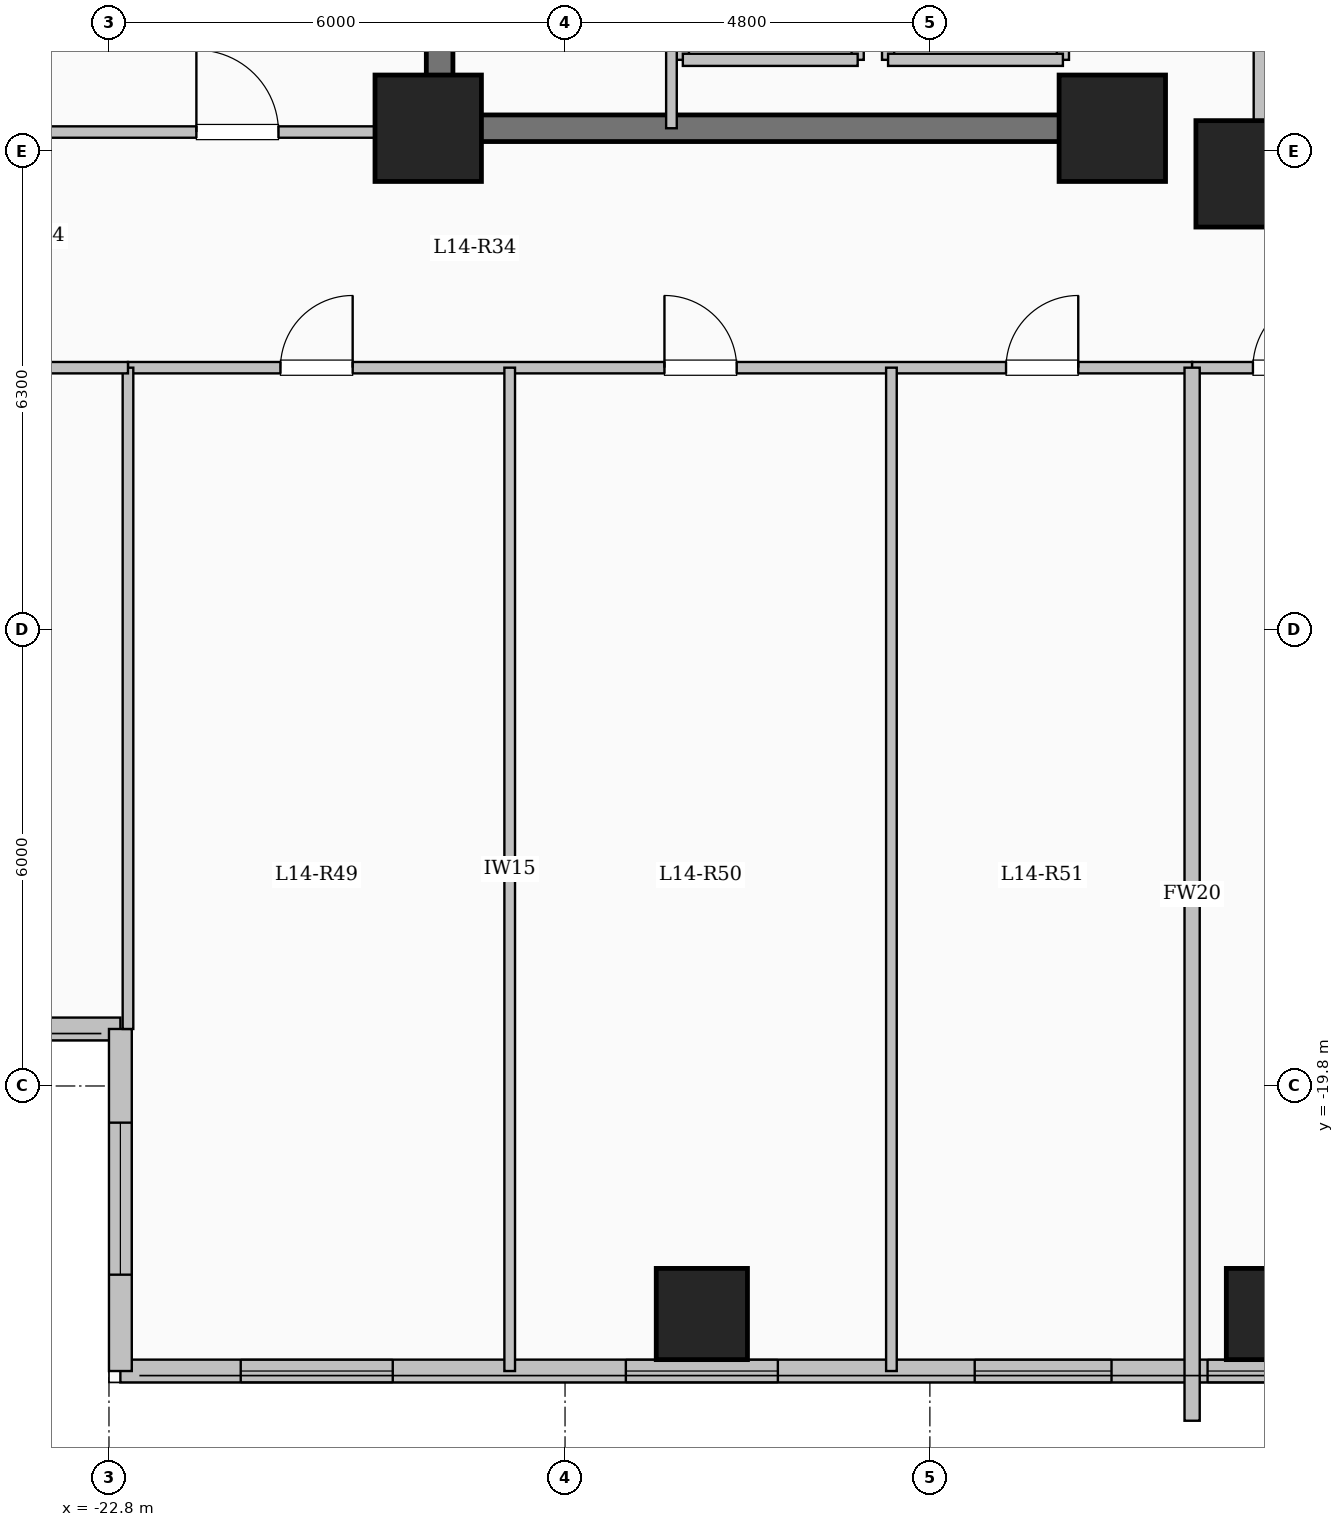
"""IFC4 building model, lengths in metres.
Left out: names, types, materials, properties, quantities, classifications, styles, units other than length and angle.
Written with IfcOpenShell. Run it as: python <this file> out.ifc"""

import sys

from ifc_helpers import new_model, si_unit, direction, frame, frame_2d, origin, origin_2d, place, context, subcontext, project, spatial, rectangle, extrude, element, fill, save


model = new_model("IFC4")
c1 = context("Model", 3, precision=1e-05, world=origin(), true_north=direction((0.0, 1.0)))
c2 = subcontext(c1, "Body", "Model", "MODEL_VIEW")
j1 = project(units=[si_unit("LENGTHUNIT", "METRE"), si_unit("PLANEANGLEUNIT", "RADIAN")], contexts=[c1])
p1 = place(None, origin())
s1 = spatial("IfcSite", under=j1, at=p1, CompositionType="ELEMENT")
p2 = place(p1, origin())
s2 = spatial("IfcBuilding", under=s1, at=p2, CompositionType="ELEMENT")
p3 = place(p2, frame((0.0, 0.0, 54.15)))
s3 = spatial("IfcBuildingStorey", under=s2, at=p3, CompositionType="ELEMENT", Elevation=54.15)
for number, where, z_axis, x_axis in (
    (1, (-7.8, -7.8, 0.0), (0.0, 0.0, 1.0), (1.0, 0.0, 0.0)),
    (2, (-9.6, -7.2, 0.0), (0.0, 0.0, 1.0), (1.0, 0.0, 0.0)),
    (3, (-18.6, -7.2, 0.0), (0.0, 0.0, 1.0), (1.0, 0.0, 0.0)),
):
    element("IfcColumn", number, at=place(p3, frame(where, z_axis=z_axis, x_axis=x_axis)), inside=s3, PredefinedType="COLUMN", context=c2, shape_type="SweptSolid", body=[
        extrude(rectangle(XDim=1.4, YDim=1.4, at=origin_2d()), origin(), (0.0, 0.0, 1.0), 3.35),
    ])
for number, where, z_axis, x_axis in (
    (4, (-15.0, -22.8, 0.0), (0.0, 0.0, 1.0), (1.0, 0.0, 0.0)),
    (5, (-7.5, -22.8, 0.0), (0.0, 0.0, 1.0), (1.0, 0.0, 0.0)),
):
    element("IfcColumn", number, at=place(p3, frame(where, z_axis=z_axis, x_axis=x_axis)), inside=s3, PredefinedType="COLUMN", context=c2, shape_type="SweptSolid", body=[
        extrude(rectangle(XDim=1.2, YDim=1.2, at=origin_2d()), origin(), (0.0, 0.0, 1.0), 3.35),
    ])
p4 = place(p3, frame((-7.62, -7.62, 0.0), z_axis=(0.0, 0.0, 1.0), x_axis=(1.0, 0.0, 0.0)))
e6 = element("IfcWall", 6, at=p4, inside=s3, PredefinedType="SOLIDWALL", context=c2, shape_type="SweptSolid", body=[
    extrude(rectangle(XDim=15.24, YDim=0.24, at=frame_2d((7.62, 0.0))), origin(), (0.0, 0.0, 1.0), 3.1),
])
p5 = place(p4, frame((6.92, 0.0, 0.95)))
e7 = element("IfcOpeningElement", 7, at=p5, cuts=e6, PredefinedType="OPENING", context=c2, shape_type="SweptSolid", body=[
    extrude(rectangle(XDim=1.4, YDim=1.5, at=frame_2d((0.7, 0.75))), frame((0.0, 0.13, 0.0), z_axis=(0.0, -1.0, 0.0), x_axis=(1.0, 0.0, 0.0)), (0.0, 0.0, 1.0), 0.26),
])
p6 = place(p3, frame((-7.62, 7.62, 0.0), z_axis=(0.0, 0.0, 1.0), x_axis=(0.0, -1.0, 0.0)))
e8 = element("IfcWall", 8, at=p6, inside=s3, PredefinedType="SOLIDWALL", context=c2, shape_type="SweptSolid", body=[
    extrude(rectangle(XDim=15.24, YDim=0.24, at=frame_2d((7.62, 0.0))), origin(), (0.0, 0.0, 1.0), 3.1),
])
p7 = place(p6, frame((6.92, 0.0, 0.95)))
e9 = element("IfcOpeningElement", 9, at=p7, cuts=e8, PredefinedType="OPENING", context=c2, shape_type="SweptSolid", body=[
    extrude(rectangle(XDim=1.4, YDim=1.5, at=frame_2d((0.7, 0.75))), frame((0.0, 0.13, 0.0), z_axis=(0.0, -1.0, 0.0), x_axis=(1.0, 0.0, 0.0)), (0.0, 0.0, 1.0), 0.26),
])
p8 = place(p3, frame((-22.65, -19.05, 0.0), z_axis=(0.0, 0.0, 1.0), x_axis=(-1.0, 0.0, 0.0)))
e10 = element("IfcWall", 10, at=p8, inside=s3, PredefinedType="SOLIDWALL", context=c2, shape_type="SweptSolid", body=[
    extrude(rectangle(XDim=6.0, YDim=0.3, at=frame_2d((3.0, 0.0))), origin(), (0.0, 0.0, 1.0), 3.1),
])
p9 = place(p8, frame((1.775, 0.0, 0.9)))
e11 = element("IfcOpeningElement", 11, at=p9, cuts=e10, PredefinedType="OPENING", context=c2, shape_type="SweptSolid", body=[
    extrude(rectangle(XDim=2.4, YDim=1.8, at=frame_2d((1.2, 0.9))), frame((0.0, 0.16, 0.0), z_axis=(0.0, -1.0, 0.0), x_axis=(1.0, 0.0, 0.0)), (0.0, 0.0, 1.0), 0.32),
])
p10 = place(p3, frame((-7.35, -23.55, 0.0), z_axis=(0.0, 0.0, 1.0), x_axis=(-1.0, 0.0, 0.0)))
e12 = element("IfcWall", 12, at=p10, inside=s3, PredefinedType="SOLIDWALL", context=c2, shape_type="SweptSolid", body=[
    extrude(rectangle(XDim=15.3, YDim=0.3, at=frame_2d((7.65, 0.0))), origin(), (0.0, 0.0, 1.0), 3.1),
])
p11 = place(p10, frame((0.147, 0.0, 0.95)))
e13 = element("IfcOpeningElement", 13, at=p11, cuts=e12, PredefinedType="OPENING", context=c2, shape_type="SweptSolid", body=[
    extrude(rectangle(XDim=0.85, YDim=1.5, at=frame_2d((0.425, 0.75))), frame((0.0, 0.16, 0.0), z_axis=(0.0, -1.0, 0.0), x_axis=(1.0, 0.0, 0.0)), (0.0, 0.0, 1.0), 0.32),
])
p12 = place(p10, frame((2.26, 0.0, 0.9)))
e14 = element("IfcOpeningElement", 14, at=p12, cuts=e12, PredefinedType="OPENING", context=c2, shape_type="SweptSolid", body=[
    extrude(rectangle(XDim=1.8, YDim=1.65, at=frame_2d((0.9, 0.825))), frame((0.0, 0.16, 0.0), z_axis=(0.0, -1.0, 0.0), x_axis=(1.0, 0.0, 0.0)), (0.0, 0.0, 1.0), 0.32),
])
p13 = place(p10, frame((6.65, 0.0, 0.9)))
e15 = element("IfcOpeningElement", 15, at=p13, cuts=e12, PredefinedType="OPENING", context=c2, shape_type="SweptSolid", body=[
    extrude(rectangle(XDim=2.0, YDim=1.7, at=frame_2d((1.0, 0.85))), frame((0.0, 0.16, 0.0), z_axis=(0.0, -1.0, 0.0), x_axis=(1.0, 0.0, 0.0)), (0.0, 0.0, 1.0), 0.32),
])
p14 = place(p10, frame((11.717, 0.0, 0.9)))
e16 = element("IfcOpeningElement", 16, at=p14, cuts=e12, PredefinedType="OPENING", context=c2, shape_type="SweptSolid", body=[
    extrude(rectangle(XDim=2.0, YDim=1.7, at=frame_2d((1.0, 0.85))), frame((0.0, 0.16, 0.0), z_axis=(0.0, -1.0, 0.0), x_axis=(1.0, 0.0, 0.0)), (0.0, 0.0, 1.0), 0.32),
])
p15 = place(p3, frame((-22.65, -23.55, 0.0), z_axis=(0.0, 0.0, 1.0), x_axis=(0.0, 1.0, 0.0)))
e17 = element("IfcWall", 17, at=p15, inside=s3, PredefinedType="SOLIDWALL", context=c2, shape_type="SweptSolid", body=[
    extrude(rectangle(XDim=4.5, YDim=0.3, at=frame_2d((2.25, 0.0))), origin(), (0.0, 0.0, 1.0), 3.1),
])
p16 = place(p15, frame((1.268, 0.0, 0.9)))
e18 = element("IfcOpeningElement", 18, at=p16, cuts=e17, PredefinedType="OPENING", context=c2, shape_type="SweptSolid", body=[
    extrude(rectangle(XDim=2.0, YDim=1.7, at=frame_2d((1.0, 0.85))), frame((0.0, 0.16, 0.0), z_axis=(0.0, -1.0, 0.0), x_axis=(1.0, 0.0, 0.0)), (0.0, 0.0, 1.0), 0.32),
])
p17 = place(p3, frame((-12.55, -6.3, 0.0), z_axis=(0.0, 0.0, 1.0), x_axis=(0.0, 1.0, 0.0)))
e19 = element("IfcWall", 19, at=p17, inside=s3, PredefinedType="SOLIDWALL", context=c2, shape_type="SweptSolid", body=[
    extrude(rectangle(XDim=2.6, YDim=0.16, at=frame_2d((1.3, 0.0))), origin(), (0.0, 0.0, 1.0), 3.1),
])
p18 = place(p3, frame((-10.25, -6.3, 0.0), z_axis=(0.0, 0.0, 1.0), x_axis=(0.0, 1.0, 0.0)))
e20 = element("IfcWall", 20, at=p18, inside=s3, PredefinedType="SOLIDWALL", context=c2, shape_type="SweptSolid", body=[
    extrude(rectangle(XDim=2.6, YDim=0.16, at=frame_2d((1.3, 0.0))), origin(), (0.0, 0.0, 1.0), 3.1),
])
p19 = place(p18, frame((0.75, 0.0, 0.0)))
e21 = element("IfcOpeningElement", 21, at=p19, cuts=e20, PredefinedType="OPENING", context=c2, shape_type="SweptSolid", body=[
    extrude(rectangle(XDim=1.1, YDim=2.15, at=frame_2d((0.55, 1.075))), frame((0.0, 0.09, 0.0), z_axis=(0.0, -1.0, 0.0), x_axis=(1.0, 0.0, 0.0)), (0.0, 0.0, 1.0), 0.18),
])
p20 = place(p3, frame((-12.55, -6.3, 0.0), z_axis=(0.0, 0.0, 1.0), x_axis=(1.0, 0.0, 0.0)))
e22 = element("IfcWall", 22, at=p20, inside=s3, PredefinedType="SOLIDWALL", context=c2, shape_type="SweptSolid", body=[
    extrude(rectangle(XDim=2.3, YDim=0.16, at=frame_2d((1.15, 0.0))), origin(), (0.0, 0.0, 1.0), 3.1),
])
for number, where, z_axis, x_axis in (
    (23, (-15.25, -6.3, 0.0), (0.0, 0.0, 1.0), (0.0, 1.0, 0.0)),
    (24, (-12.95, -6.3, 0.0), (0.0, 0.0, 1.0), (0.0, 1.0, 0.0)),
):
    element("IfcWall", number, at=place(p3, frame(where, z_axis=z_axis, x_axis=x_axis)), inside=s3, PredefinedType="SOLIDWALL", context=c2, shape_type="SweptSolid", body=[
        extrude(rectangle(XDim=2.6, YDim=0.16, at=frame_2d((1.3, 0.0))), origin(), (0.0, 0.0, 1.0), 3.1),
    ])
p21 = place(p3, frame((-15.25, -6.3, 0.0), z_axis=(0.0, 0.0, 1.0), x_axis=(1.0, 0.0, 0.0)))
e25 = element("IfcWall", 25, at=p21, inside=s3, PredefinedType="SOLIDWALL", context=c2, shape_type="SweptSolid", body=[
    extrude(rectangle(XDim=2.3, YDim=0.16, at=frame_2d((1.15, 0.0))), origin(), (0.0, 0.0, 1.0), 3.1),
])
p22 = place(p3, frame((-18.45, -7.375, 0.0), z_axis=(0.0, 0.0, 1.0), x_axis=(0.0, 1.0, 0.0)))
e26 = element("IfcWall", 26, at=p22, inside=s3, PredefinedType="SHEAR", context=c2, shape_type="SweptSolid", body=[
    extrude(rectangle(XDim=14.05, YDim=0.35, at=frame_2d((7.025, 0.0))), origin(), (0.0, 0.0, 1.0), 3.35),
])
p23 = place(p3, frame((-18.625, -7.2, 0.0), z_axis=(0.0, 0.0, 1.0), x_axis=(1.0, 0.0, 0.0)))
e27 = element("IfcWall", 27, at=p23, inside=s3, PredefinedType="SHEAR", context=c2, shape_type="SweptSolid", body=[
    extrude(rectangle(XDim=8.55, YDim=0.35, at=frame_2d((4.275, 0.0))), origin(), (0.0, 0.0, 1.0), 3.35),
])
p24 = place(p3, frame((-15.4, -7.2, 0.0), z_axis=(0.0, 0.0, 1.0), x_axis=(0.0, 1.0, 0.0)))
e28 = element("IfcWall", 28, at=p24, inside=s3, PredefinedType="PARTITIONING", context=c2, shape_type="SweptSolid", body=[
    extrude(rectangle(XDim=10.45, YDim=0.14, at=frame_2d((5.225, 0.0))), origin(), (0.0, 0.0, 1.0), 3.1),
])
p25 = place(p24, frame((9.25, 0.0, 0.0)))
e29 = element("IfcOpeningElement", 29, at=p25, cuts=e28, PredefinedType="OPENING", context=c2, shape_type="SweptSolid", body=[
    extrude(rectangle(XDim=0.9, YDim=2.08, at=frame_2d((0.45, 1.04))), frame((0.0, 0.08, 0.0), z_axis=(0.0, -1.0, 0.0), x_axis=(1.0, 0.0, 0.0)), (0.0, 0.0, 1.0), 0.16),
])
p26 = place(p3, frame((-22.55, -10.35, 0.0), z_axis=(0.0, 0.0, 1.0), x_axis=(1.0, 0.0, 0.0)))
e30 = element("IfcWall", 30, at=p26, inside=s3, PredefinedType="PARTITIONING", context=c2, shape_type="SweptSolid", body=[
    extrude(rectangle(XDim=14.0, YDim=0.15, at=frame_2d((7.0, 0.0))), origin(), (0.0, 0.0, 1.0), 3.1),
])
p27 = place(p26, frame((2.006, 0.0, 0.0)))
e31 = element("IfcOpeningElement", 31, at=p27, cuts=e30, PredefinedType="OPENING", context=c2, shape_type="SweptSolid", body=[
    extrude(rectangle(XDim=0.95, YDim=2.15, at=frame_2d((0.475, 1.075))), frame((0.0, 0.085, 0.0), z_axis=(0.0, -1.0, 0.0), x_axis=(1.0, 0.0, 0.0)), (0.0, 0.0, 1.0), 0.17),
])
p28 = place(p26, frame((7.058, 0.0, 0.0)))
e32 = element("IfcOpeningElement", 32, at=p28, cuts=e30, PredefinedType="OPENING", context=c2, shape_type="SweptSolid", body=[
    extrude(rectangle(XDim=0.95, YDim=2.15, at=frame_2d((0.475, 1.075))), frame((0.0, 0.085, 0.0), z_axis=(0.0, -1.0, 0.0), x_axis=(1.0, 0.0, 0.0)), (0.0, 0.0, 1.0), 0.17),
])
p29 = place(p26, frame((11.552, 0.0, 0.0)))
e33 = element("IfcOpeningElement", 33, at=p29, cuts=e30, PredefinedType="OPENING", context=c2, shape_type="SweptSolid", body=[
    extrude(rectangle(XDim=0.95, YDim=2.15, at=frame_2d((0.475, 1.075))), frame((0.0, 0.085, 0.0), z_axis=(0.0, -1.0, 0.0), x_axis=(1.0, 0.0, 0.0)), (0.0, 0.0, 1.0), 0.17),
])
p30 = place(p3, frame((-8.55, -10.35, 0.0), z_axis=(0.0, 0.0, 1.0), x_axis=(1.0, 0.0, 0.0)))
e34 = element("IfcWall", 34, at=p30, inside=s3, PredefinedType="PARTITIONING", context=c2, shape_type="SweptSolid", body=[
    extrude(rectangle(XDim=17.1, YDim=0.15, at=frame_2d((8.55, 0.0))), origin(), (0.0, 0.0, 1.0), 3.1),
])
p31 = place(p30, frame((0.8, 0.0, 0.0)))
e35 = element("IfcOpeningElement", 35, at=p31, cuts=e34, PredefinedType="OPENING", context=c2, shape_type="SweptSolid", body=[
    extrude(rectangle(XDim=0.96, YDim=2.15, at=frame_2d((0.48, 1.075))), frame((0.0, 0.085, 0.0), z_axis=(0.0, -1.0, 0.0), x_axis=(1.0, 0.0, 0.0)), (0.0, 0.0, 1.0), 0.17),
])
for number, where, z_axis, x_axis in (
    (36, (-17.528, -23.55, 0.0), (0.0, 0.0, 1.0), (0.0, 1.0, 0.0)),
    (37, (-12.506, -23.55, 0.0), (0.0, 0.0, 1.0), (0.0, 1.0, 0.0)),
):
    element("IfcWall", number, at=place(p3, frame(where, z_axis=z_axis, x_axis=x_axis)), inside=s3, PredefinedType="PARTITIONING", context=c2, shape_type="SweptSolid", body=[
        extrude(rectangle(XDim=13.2, YDim=0.14, at=frame_2d((6.6, 0.0))), origin(), (0.0, 0.0, 1.0), 3.1),
    ])
p32 = place(p3, frame((-8.55, -24.204, 0.0), z_axis=(0.0, 0.0, 1.0), x_axis=(0.0, 1.0, 0.0)))
e38 = element("IfcWall", 38, at=p32, inside=s3, PredefinedType="SOLIDWALL", context=c2, shape_type="SweptSolid", body=[
    extrude(rectangle(XDim=13.854, YDim=0.2, at=frame_2d((6.927, 0.0))), origin(), (0.0, 0.0, 1.0), 3.1),
])
p33 = place(p3, frame((-28.68, -7.25, 0.0), z_axis=(0.0, 0.0, 1.0), x_axis=(1.0, 0.0, 0.0)))
e39 = element("IfcWall", 39, at=p33, inside=s3, PredefinedType="PARTITIONING", context=c2, shape_type="SweptSolid", body=[
    extrude(rectangle(XDim=10.23, YDim=0.15, at=frame_2d((5.115, 0.0))), origin(), (0.0, 0.0, 1.0), 3.1),
])
p34 = place(p33, frame((7.03, 0.0, 0.0)))
e40 = element("IfcOpeningElement", 40, at=p34, cuts=e39, PredefinedType="OPENING", context=c2, shape_type="SweptSolid", body=[
    extrude(rectangle(XDim=1.08, YDim=2.15, at=frame_2d((0.54, 1.075))), frame((0.0, 0.085, 0.0), z_axis=(0.0, -1.0, 0.0), x_axis=(1.0, 0.0, 0.0)), (0.0, 0.0, 1.0), 0.17),
])
p35 = place(p3, frame((-22.55, -19.05, 0.0), z_axis=(0.0, 0.0, 1.0), x_axis=(0.0, 1.0, 0.0)))
e41 = element("IfcWall", 41, at=p35, inside=s3, PredefinedType="PARTITIONING", context=c2, shape_type="SweptSolid", body=[
    extrude(rectangle(XDim=8.7, YDim=0.14, at=frame_2d((4.35, 0.0))), origin(), (0.0, 0.0, 1.0), 3.1),
])
p36 = place(p3, frame((-28.68, -10.35, 0.0), z_axis=(0.0, 0.0, 1.0), x_axis=(1.0, 0.0, 0.0)))
e42 = element("IfcWall", 42, at=p36, inside=s3, PredefinedType="PARTITIONING", context=c2, shape_type="SweptSolid", body=[
    extrude(rectangle(XDim=6.13, YDim=0.15, at=frame_2d((3.065, 0.0))), origin(), (0.0, 0.0, 1.0), 3.1),
])
p37 = place(p36, frame((2.59, 0.0, 0.0)))
e43 = element("IfcOpeningElement", 43, at=p37, cuts=e42, PredefinedType="OPENING", context=c2, shape_type="SweptSolid", body=[
    extrude(rectangle(XDim=0.95, YDim=2.15, at=frame_2d((0.475, 1.075))), frame((0.0, 0.085, 0.0), z_axis=(0.0, -1.0, 0.0), x_axis=(1.0, 0.0, 0.0)), (0.0, 0.0, 1.0), 0.17),
])
p38 = place(p11, origin())
e44 = element("IfcWindow", 44, at=p38, inside=s3, PartitioningType="SINGLE_PANEL", PredefinedType="WINDOW", context=c2, shape_type="SweptSolid", body=[
    extrude(rectangle(XDim=0.85, YDim=1.5, at=frame_2d((0.425, 0.75))), frame((0.0, 0.03, 0.0), z_axis=(0.0, -1.0, 0.0), x_axis=(1.0, 0.0, 0.0)), (0.0, 0.0, 1.0), 0.06),
])
fill(e13, e44)
p39 = place(p12, origin())
e45 = element("IfcWindow", 45, at=p39, inside=s3, PartitioningType="SINGLE_PANEL", PredefinedType="WINDOW", context=c2, shape_type="SweptSolid", body=[
    extrude(rectangle(XDim=1.8, YDim=1.65, at=frame_2d((0.9, 0.825))), frame((0.0, 0.03, 0.0), z_axis=(0.0, -1.0, 0.0), x_axis=(1.0, 0.0, 0.0)), (0.0, 0.0, 1.0), 0.06),
])
fill(e14, e45)
p40 = place(p13, origin())
e46 = element("IfcWindow", 46, at=p40, inside=s3, PartitioningType="SINGLE_PANEL", PredefinedType="WINDOW", context=c2, shape_type="SweptSolid", body=[
    extrude(rectangle(XDim=2.0, YDim=1.7, at=frame_2d((1.0, 0.85))), frame((0.0, 0.03, 0.0), z_axis=(0.0, -1.0, 0.0), x_axis=(1.0, 0.0, 0.0)), (0.0, 0.0, 1.0), 0.06),
])
fill(e15, e46)
p41 = place(p14, origin())
e47 = element("IfcWindow", 47, at=p41, inside=s3, PartitioningType="SINGLE_PANEL", PredefinedType="WINDOW", context=c2, shape_type="SweptSolid", body=[
    extrude(rectangle(XDim=2.0, YDim=1.7, at=frame_2d((1.0, 0.85))), frame((0.0, 0.03, 0.0), z_axis=(0.0, -1.0, 0.0), x_axis=(1.0, 0.0, 0.0)), (0.0, 0.0, 1.0), 0.06),
])
fill(e16, e47)
p42 = place(p16, origin())
e48 = element("IfcWindow", 48, at=p42, inside=s3, PartitioningType="SINGLE_PANEL", PredefinedType="WINDOW", context=c2, shape_type="SweptSolid", body=[
    extrude(rectangle(XDim=2.0, YDim=1.7, at=frame_2d((1.0, 0.85))), frame((0.0, 0.03, 0.0), z_axis=(0.0, -1.0, 0.0), x_axis=(1.0, 0.0, 0.0)), (0.0, 0.0, 1.0), 0.06),
])
fill(e18, e48)
p43 = place(p27, origin())
e49 = element("IfcDoor", 49, at=p43, inside=s3, OperationType="SINGLE_SWING_RIGHT", PredefinedType="DOOR", context=c2, shape_type="SweptSolid", body=[
    extrude(rectangle(XDim=0.95, YDim=2.15, at=frame_2d((0.475, 1.075))), frame((0.0, 0.025, 0.0), z_axis=(0.0, -1.0, 0.0), x_axis=(1.0, 0.0, 0.0)), (0.0, 0.0, 1.0), 0.05),
])
fill(e31, e49)
p44 = place(p28, origin())
e50 = element("IfcDoor", 50, at=p44, inside=s3, OperationType="SINGLE_SWING_LEFT", PredefinedType="DOOR", context=c2, shape_type="SweptSolid", body=[
    extrude(rectangle(XDim=0.95, YDim=2.15, at=frame_2d((0.475, 1.075))), frame((0.0, 0.025, 0.0), z_axis=(0.0, -1.0, 0.0), x_axis=(1.0, 0.0, 0.0)), (0.0, 0.0, 1.0), 0.05),
])
fill(e32, e50)
p45 = place(p29, origin())
e51 = element("IfcDoor", 51, at=p45, inside=s3, OperationType="SINGLE_SWING_RIGHT", PredefinedType="DOOR", context=c2, shape_type="SweptSolid", body=[
    extrude(rectangle(XDim=0.95, YDim=2.15, at=frame_2d((0.475, 1.075))), frame((0.0, 0.025, 0.0), z_axis=(0.0, -1.0, 0.0), x_axis=(1.0, 0.0, 0.0)), (0.0, 0.0, 1.0), 0.05),
])
fill(e33, e51)
p46 = place(p31, origin())
e52 = element("IfcDoor", 52, at=p46, inside=s3, OperationType="SINGLE_SWING_RIGHT", PredefinedType="DOOR", context=c2, shape_type="SweptSolid", body=[
    extrude(rectangle(XDim=0.96, YDim=2.15, at=frame_2d((0.48, 1.075))), frame((0.0, 0.025, 0.0), z_axis=(0.0, -1.0, 0.0), x_axis=(1.0, 0.0, 0.0)), (0.0, 0.0, 1.0), 0.05),
])
fill(e35, e52)
p47 = place(p34, origin())
e53 = element("IfcDoor", 53, at=p47, inside=s3, OperationType="SINGLE_SWING_LEFT", PredefinedType="DOOR", context=c2, shape_type="SweptSolid", body=[
    extrude(rectangle(XDim=1.08, YDim=2.15, at=frame_2d((0.54, 1.075))), frame((0.0, 0.025, 0.0), z_axis=(0.0, -1.0, 0.0), x_axis=(1.0, 0.0, 0.0)), (0.0, 0.0, 1.0), 0.05),
])
fill(e40, e53)
save(model, sys.argv[1])
